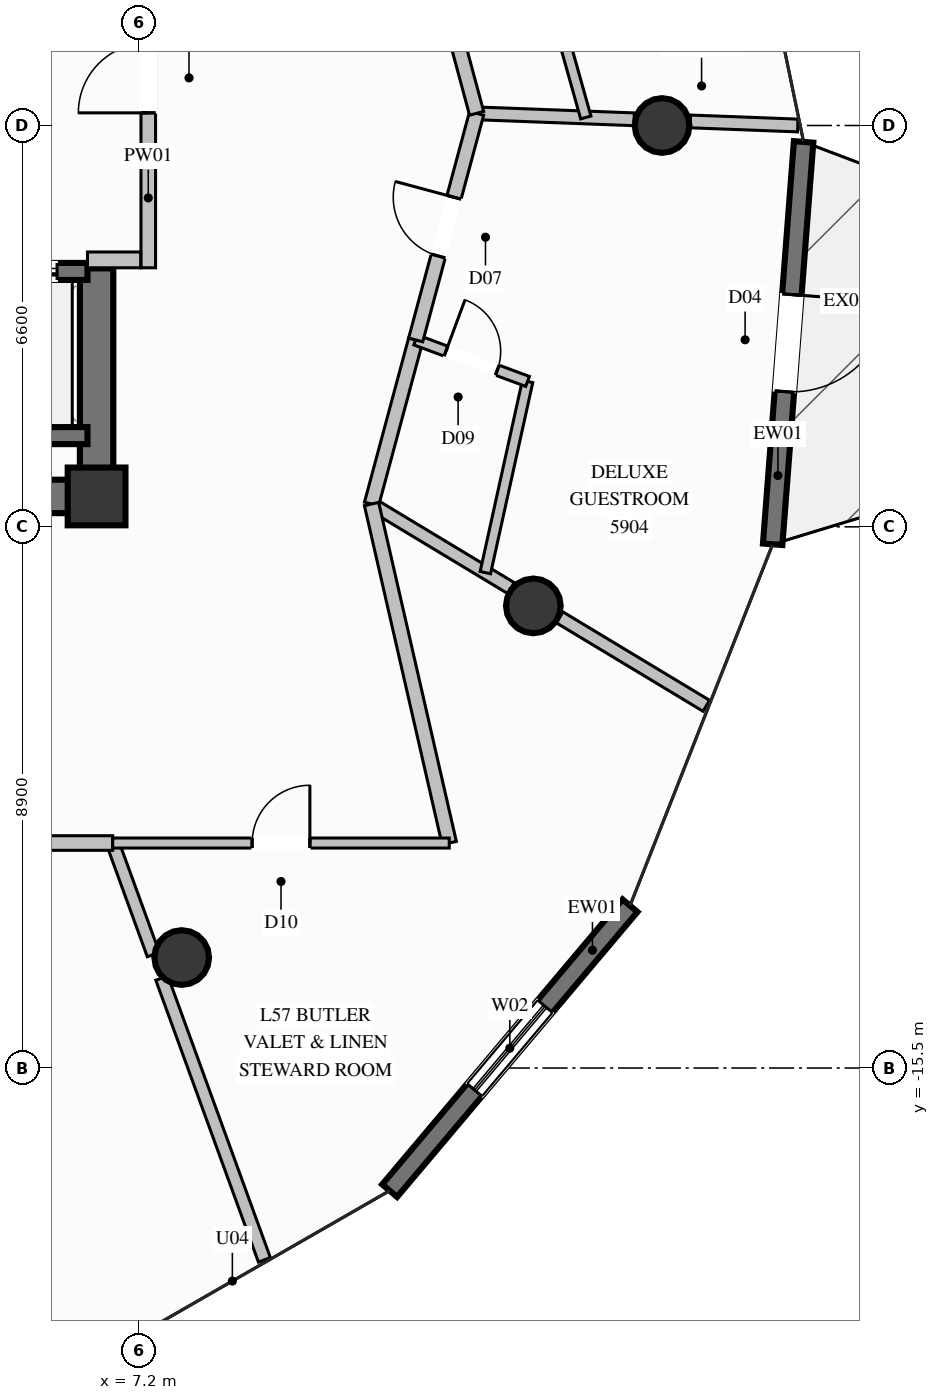
"""IFC4 building model, lengths in metres.
Left out: names, types, materials, properties, quantities, classifications, styles, units other than length and angle.
Written with IfcOpenShell. Run it as: python <this file> out.ifc"""

import sys

from ifc_helpers import new_model, si_unit, direction, frame, frame_2d, origin, origin_2d, place, context, subcontext, project, spatial, rectangle, circle, extrude, element, fill, save


model = new_model("IFC4")
c1 = context("Model", 3, precision=1e-05, world=origin(), true_north=direction((0.0, 1.0)))
c2 = subcontext(c1, "Body", "Model", "MODEL_VIEW")
j1 = project(units=[si_unit("LENGTHUNIT", "METRE"), si_unit("PLANEANGLEUNIT", "RADIAN")], contexts=[c1])
p1 = place(None, origin())
s1 = spatial("IfcSite", under=j1, at=p1, CompositionType="ELEMENT")
p2 = place(p1, origin())
s2 = spatial("IfcBuilding", under=s1, at=p2, CompositionType="ELEMENT")
p3 = place(p2, frame((0.0, 0.0, 220.0)))
s3 = spatial("IfcBuildingStorey", under=s2, at=p3, CompositionType="ELEMENT", Elevation=220.0)
p4 = place(p3, frame((6.5, -6.1, 0.0), z_axis=(0.0, 0.0, 1.0), x_axis=(1.0, 0.0, 0.0)))
e1 = element("IfcColumn", 1, at=p4, inside=s3, PredefinedType="COLUMN", context=c2, shape_type="SweptSolid", body=[
    extrude(rectangle(XDim=0.95, YDim=0.95, at=origin_2d()), origin(), (0.0, 0.0, 1.0), 3.6),
])
p5 = place(p3, frame((4.15, -6.1, 0.0), z_axis=(0.0, 0.0, 1.0), x_axis=(1.0, 0.0, 0.0)))
e2 = element("IfcWall", 2, at=p5, inside=s3, PredefinedType="SHEAR", context=c2, shape_type="SweptSolid", body=[
    extrude(rectangle(XDim=2.075, YDim=0.55, at=frame_2d((1.038, 0.0))), origin(), (0.0, 0.0, 1.0), 3.6),
])
p6 = place(p3, frame((6.5, -6.375, 0.0), z_axis=(0.0, 0.0, 1.0), x_axis=(0.0, 1.0, 0.0)))
e3 = element("IfcWall", 3, at=p6, inside=s3, PredefinedType="SHEAR", context=c2, shape_type="SweptSolid", body=[
    extrude(rectangle(XDim=4.025, YDim=0.55, at=frame_2d((2.012, 0.0))), origin(), (0.0, 0.0, 1.0), 3.6),
])
for number, where, z_axis, x_axis in (
    (4, (15.8, 0.0, 0.0), (0.0, 0.0, 1.0), (1.0, 0.0, 0.0)),
    (5, (7.9, -13.683, 0.0), (0.0, 0.0, 1.0), (1.0, 0.0, 0.0)),
    (6, (13.683, -7.9, 0.0), (0.0, 0.0, 1.0), (1.0, 0.0, 0.0)),
):
    element("IfcColumn", number, at=place(p3, frame(where, z_axis=z_axis, x_axis=x_axis)), inside=s3, PredefinedType="COLUMN", context=c2, shape_type="SweptSolid", body=[
        extrude(circle(Radius=0.45, at=origin_2d()), origin(), (0.0, 0.0, 1.0), 3.6),
    ])
p7 = place(p3, frame((15.273, -12.83, 0.0), z_axis=(0.0, 0.0, 1.0), x_axis=(-0.644700837275, -0.764434974616, 0.0)))
e7 = element("IfcWall", 7, at=p7, inside=s3, PredefinedType="SOLIDWALL", context=c2, shape_type="SweptSolid", body=[
    extrude(rectangle(XDim=6.131, YDim=0.32, at=frame_2d((3.066, 0.0))), origin(), (0.0, 0.0, 1.0), 3.36),
])
p8 = place(p7, frame((2.166, 0.0, 0.35)))
e8 = element("IfcOpeningElement", 8, at=p8, cuts=e7, PredefinedType="OPENING", context=c2, shape_type="SweptSolid", body=[
    extrude(rectangle(XDim=1.8, YDim=2.6, at=frame_2d((0.9, 1.3))), frame((0.0, 0.17, 0.0), z_axis=(0.0, -1.0, 0.0), x_axis=(1.0, 0.0, 0.0)), (0.0, 0.0, 1.0), 0.34),
])
p9 = place(p3, frame((18.128, -0.27, 0.0), z_axis=(0.0, 0.0, 1.0), x_axis=(-0.076702125221, -0.997054052691, 0.0)))
e9 = element("IfcWall", 9, at=p9, inside=s3, PredefinedType="SOLIDWALL", context=c2, shape_type="SweptSolid", body=[
    extrude(rectangle(XDim=6.636, YDim=0.32, at=frame_2d((3.318, 0.0))), origin(), (0.0, 0.0, 1.0), 3.36),
])
p10 = place(p9, frame((2.518, 0.0, 0.0)))
e10 = element("IfcOpeningElement", 10, at=p10, cuts=e9, PredefinedType="OPENING", context=c2, shape_type="SweptSolid", body=[
    extrude(rectangle(XDim=1.6, YDim=2.3, at=frame_2d((0.8, 1.15))), frame((0.0, 0.17, 0.0), z_axis=(0.0, -1.0, 0.0), x_axis=(1.0, 0.0, 0.0)), (0.0, 0.0, 1.0), 0.34),
])
p11 = place(p3, frame((4.15, -5.1, 0.0), z_axis=(0.0, 0.0, 1.0), x_axis=(1.0, 0.0, 0.0)))
e11 = element("IfcWall", 11, at=p11, inside=s3, PredefinedType="SOLIDWALL", context=c2, shape_type="SweptSolid", body=[
    extrude(rectangle(XDim=2.2, YDim=0.28, at=frame_2d((1.1, 0.0))), origin(), (0.0, 0.0, 1.0), 3.36),
])
p12 = place(p3, frame((6.35, -2.4, 0.0), z_axis=(0.0, 0.0, 1.0), x_axis=(-1.0, 0.0, 0.0)))
e12 = element("IfcWall", 12, at=p12, inside=s3, PredefinedType="SOLIDWALL", context=c2, shape_type="SweptSolid", body=[
    extrude(rectangle(XDim=2.2, YDim=0.28, at=frame_2d((1.1, 0.0))), origin(), (0.0, 0.0, 1.0), 3.36),
])
p13 = place(p12, frame((0.5, 0.0, 0.0)))
e13 = element("IfcOpeningElement", 13, at=p13, cuts=e12, PredefinedType="OPENING", context=c2, shape_type="SweptSolid", body=[
    extrude(rectangle(XDim=1.2, YDim=2.2, at=frame_2d((0.6, 1.1))), frame((0.0, 0.15, 0.0), z_axis=(0.0, -1.0, 0.0), x_axis=(1.0, 0.0, 0.0)), (0.0, 0.0, 1.0), 0.3),
])
p14 = place(p3, frame((7.35, -2.34, 0.0), z_axis=(0.0, 0.0, 1.0), x_axis=(0.0, 1.0, 0.0)))
e14 = element("IfcWall", 14, at=p14, inside=s3, PredefinedType="PARTITIONING", context=c2, shape_type="SweptSolid", body=[
    extrude(rectangle(XDim=5.07, YDim=0.24, at=frame_2d((2.535, 0.0))), origin(), (0.0, 0.0, 1.0), 2.445),
])
p15 = place(p14, frame((2.548, 0.0, 0.0)))
e15 = element("IfcOpeningElement", 15, at=p15, cuts=e14, PredefinedType="OPENING", context=c2, shape_type="SweptSolid", body=[
    extrude(rectangle(XDim=1.15, YDim=2.2, at=frame_2d((0.575, 1.1))), frame((0.0, 0.13, 0.0), z_axis=(0.0, -1.0, 0.0), x_axis=(1.0, 0.0, 0.0)), (0.0, 0.0, 1.0), 0.26),
])
p16 = place(p3, frame((6.35, -2.21, 0.0), z_axis=(0.0, 0.0, 1.0), x_axis=(1.0, 0.0, 0.0)))
e16 = element("IfcWall", 16, at=p16, inside=s3, PredefinedType="PARTITIONING", context=c2, shape_type="SweptSolid", body=[
    extrude(rectangle(XDim=0.875, YDim=0.26, at=frame_2d((0.438, 0.0))), origin(), (0.0, 0.0, 1.0), 3.36),
])
p17 = place(p3, frame((12.75, 0.2, 0.0), z_axis=(0.0, 0.0, 1.0), x_axis=(0.999286953718, -0.037756908362, 0.0)))
e17 = element("IfcWall", 17, at=p17, inside=s3, PredefinedType="PARTITIONING", context=c2, shape_type="SweptSolid", body=[
    extrude(rectangle(XDim=2.593, YDim=0.21, at=frame_2d((1.296, 0.0))), origin(), (0.0, 0.0, 1.0), 3.36),
])
p18 = place(p3, frame((16.265, 0.067, 0.0), z_axis=(0.0, 0.0, 1.0), x_axis=(0.999284239873, -0.037828665616, 0.0)))
e18 = element("IfcWall", 18, at=p18, inside=s3, PredefinedType="PARTITIONING", context=c2, shape_type="SweptSolid", body=[
    extrude(rectangle(XDim=1.768, YDim=0.21, at=frame_2d((0.884, 0.0))), origin(), (0.0, 0.0, 1.0), 3.36),
])
p19 = place(p3, frame((11.022, -6.225, 0.0), z_axis=(0.0, 0.0, 1.0), x_axis=(0.856493544161, -0.516157736366, 0.0)))
e19 = element("IfcWall", 19, at=p19, inside=s3, PredefinedType="PARTITIONING", context=c2, shape_type="SweptSolid", body=[
    extrude(rectangle(XDim=2.677, YDim=0.21, at=frame_2d((1.339, 0.0))), origin(), (0.0, 0.0, 1.0), 2.877),
])
p20 = place(p3, frame((14.114, -8.088, 0.0), z_axis=(0.0, 0.0, 1.0), x_axis=(0.856451792667, -0.516227010952, 0.0)))
e20 = element("IfcWall", 20, at=p20, inside=s3, PredefinedType="PARTITIONING", context=c2, shape_type="SweptSolid", body=[
    extrude(rectangle(XDim=2.819, YDim=0.21, at=frame_2d((1.409, 0.0))), origin(), (0.0, 0.0, 1.0), 3.36),
])
p21 = place(p3, frame((11.022, -6.225, 0.0), z_axis=(0.0, 0.0, 1.0), x_axis=(0.259760468719, 0.965673080753, 0.0)))
e21 = element("IfcWall", 21, at=p21, inside=s3, PredefinedType="PARTITIONING", context=c2, shape_type="SweptSolid", body=[
    extrude(rectangle(XDim=2.795, YDim=0.24, at=frame_2d((1.397, 0.0))), origin(), (0.0, 0.0, 1.0), 3.36),
])
p22 = place(p3, frame((12.894, -7.353, 0.0), z_axis=(0.0, 0.0, 1.0), x_axis=(0.215501104313, 0.976503596532, 0.0)))
e22 = element("IfcWall", 22, at=p22, inside=s3, PredefinedType="PLUMBINGWALL", context=c2, shape_type="SweptSolid", body=[
    extrude(rectangle(XDim=3.22, YDim=0.175, at=frame_2d((1.61, 0.0))), origin(), (0.0, 0.0, 1.0), 3.36),
])
p23 = place(p3, frame((11.748, -3.526, 0.0), z_axis=(0.0, 0.0, 1.0), x_axis=(0.937469348432, -0.348067839293, 0.0)))
e23 = element("IfcWall", 23, at=p23, inside=s3, PredefinedType="PLUMBINGWALL", context=c2, shape_type="SweptSolid", body=[
    extrude(rectangle(XDim=1.963, YDim=0.175, at=frame_2d((0.981, 0.0))), origin(), (0.0, 0.0, 1.0), 3.36),
])
p24 = place(p23, frame((0.531, 0.0, 0.0)))
e24 = element("IfcOpeningElement", 24, at=p24, cuts=e23, PredefinedType="OPENING", context=c2, shape_type="SweptSolid", body=[
    extrude(rectangle(XDim=0.9, YDim=2.1, at=frame_2d((0.45, 1.05))), frame((0.0, 0.098, 0.0), z_axis=(0.0, -1.0, 0.0), x_axis=(1.0, 0.0, 0.0)), (0.0, 0.0, 1.0), 0.195),
])
p25 = place(p3, frame((11.748, -3.526, 0.0), z_axis=(0.0, 0.0, 1.0), x_axis=(0.259694339612, 0.965690866672, 0.0)))
e25 = element("IfcWall", 25, at=p25, inside=s3, PredefinedType="PARTITIONING", context=c2, shape_type="SweptSolid", body=[
    extrude(rectangle(XDim=3.858, YDim=0.24, at=frame_2d((1.929, 0.0))), origin(), (0.0, 0.0, 1.0), 3.36),
])
p26 = place(p25, frame((1.429, 0.0, 0.0)))
e26 = element("IfcOpeningElement", 26, at=p26, cuts=e25, PredefinedType="OPENING", context=c2, shape_type="SweptSolid", body=[
    extrude(rectangle(XDim=1.0, YDim=2.2, at=frame_2d((0.5, 1.1))), frame((0.0, 0.13, 0.0), z_axis=(0.0, -1.0, 0.0), x_axis=(1.0, 0.0, 0.0)), (0.0, 0.0, 1.0), 0.26),
])
p27 = place(p3, frame((12.75, 0.2, 0.0), z_axis=(0.0, 0.0, 1.0), x_axis=(-0.259870061474, 0.965643594267, 0.0)))
e27 = element("IfcWall", 27, at=p27, inside=s3, PredefinedType="PARTITIONING", context=c2, shape_type="SweptSolid", body=[
    extrude(rectangle(XDim=2.794, YDim=0.24, at=frame_2d((1.397, 0.0))), origin(), (0.0, 0.0, 1.0), 3.36),
])
p28 = place(p3, frame((14.546, 0.132, 0.0), z_axis=(0.0, 0.0, 1.0), x_axis=(-0.270218787855, 0.962798944064, 0.0)))
e28 = element("IfcWall", 28, at=p28, inside=s3, PredefinedType="PLUMBINGWALL", context=c2, shape_type="SweptSolid", body=[
    extrude(rectangle(XDim=3.168, YDim=0.175, at=frame_2d((1.584, 0.0))), origin(), (0.0, 0.0, 1.0), 3.36),
])
p29 = place(p3, frame((6.765, -11.8, 0.0), z_axis=(0.0, 0.0, 1.0), x_axis=(0.342335512807, -0.939577775743, 0.0)))
e29 = element("IfcWall", 29, at=p29, inside=s3, PredefinedType="PARTITIONING", context=c2, shape_type="SweptSolid", body=[
    extrude(rectangle(XDim=1.952, YDim=0.21, at=frame_2d((0.976, 0.0))), origin(), (0.0, 0.0, 1.0), 2.877),
])
p30 = place(p3, frame((7.573, -14.021, 0.0), z_axis=(0.0, 0.0, 1.0), x_axis=(0.342084883254, -0.939669054854, 0.0)))
e30 = element("IfcWall", 30, at=p30, inside=s3, PredefinedType="PARTITIONING", context=c2, shape_type="SweptSolid", body=[
    extrude(rectangle(XDim=4.932, YDim=0.21, at=frame_2d((2.466, 0.0))), origin(), (0.0, 0.0, 1.0), 3.36),
])
p31 = place(p3, frame((0.0, -11.8, 0.0), z_axis=(0.0, 0.0, 1.0), x_axis=(1.0, 0.0, 0.0)))
e31 = element("IfcWall", 31, at=p31, inside=s3, PredefinedType="PARTITIONING", context=c2, shape_type="SweptSolid", body=[
    extrude(rectangle(XDim=6.765, YDim=0.24, at=frame_2d((3.382, 0.0))), origin(), (0.0, 0.0, 1.0), 3.36),
])
p32 = place(p31, frame((2.882, 0.0, 0.0)))
e32 = element("IfcOpeningElement", 32, at=p32, cuts=e31, PredefinedType="OPENING", context=c2, shape_type="SweptSolid", body=[
    extrude(rectangle(XDim=1.0, YDim=2.2, at=frame_2d((0.5, 1.1))), frame((0.0, 0.13, 0.0), z_axis=(0.0, -1.0, 0.0), x_axis=(1.0, 0.0, 0.0)), (0.0, 0.0, 1.0), 0.26),
])
p33 = place(p3, frame((12.3, -11.8, 0.0), z_axis=(0.0, 0.0, 1.0), x_axis=(-0.223456421134, 0.974713921032, 0.0)))
e33 = element("IfcWall", 33, at=p33, inside=s3, PredefinedType="PARTITIONING", context=c2, shape_type="SweptSolid", body=[
    extrude(rectangle(XDim=5.719, YDim=0.24, at=frame_2d((2.86, 0.0))), origin(), (0.0, 0.0, 1.0), 3.36),
])
p34 = place(p3, frame((6.765, -11.8, 0.0), z_axis=(0.0, 0.0, 1.0), x_axis=(1.0, 0.0, 0.0)))
e34 = element("IfcWall", 34, at=p34, inside=s3, PredefinedType="PARTITIONING", context=c2, shape_type="SweptSolid", body=[
    extrude(rectangle(XDim=5.535, YDim=0.165, at=frame_2d((2.768, 0.0))), origin(), (0.0, 0.0, 1.0), 3.36),
])
p35 = place(p34, frame((2.293, 0.0, 0.0)))
e35 = element("IfcOpeningElement", 35, at=p35, cuts=e34, PredefinedType="OPENING", context=c2, shape_type="SweptSolid", body=[
    extrude(rectangle(XDim=0.95, YDim=2.1, at=frame_2d((0.475, 1.05))), frame((0.0, 0.093, 0.0), z_axis=(0.0, -1.0, 0.0), x_axis=(1.0, 0.0, 0.0)), (0.0, 0.0, 1.0), 0.185),
])
p36 = place(p8, origin())
e36 = element("IfcWindow", 36, at=p36, inside=s3, PartitioningType="SINGLE_PANEL", PredefinedType="WINDOW", context=c2, shape_type="SweptSolid", body=[
    extrude(rectangle(XDim=1.8, YDim=2.6, at=frame_2d((0.9, 1.3))), frame((0.0, 0.03, 0.0), z_axis=(0.0, -1.0, 0.0), x_axis=(1.0, 0.0, 0.0)), (0.0, 0.0, 1.0), 0.06),
])
fill(e8, e36)
p37 = place(p10, origin())
e37 = element("IfcDoor", 37, at=p37, inside=s3, OperationType="SINGLE_SWING_LEFT", PredefinedType="DOOR", context=c2, shape_type="SweptSolid", body=[
    extrude(rectangle(XDim=1.6, YDim=2.3, at=frame_2d((0.8, 1.15))), frame((0.0, 0.025, 0.0), z_axis=(0.0, -1.0, 0.0), x_axis=(1.0, 0.0, 0.0)), (0.0, 0.0, 1.0), 0.05),
])
fill(e10, e37)
p38 = place(p13, origin())
e38 = element("IfcDoor", 38, at=p38, inside=s3, OperationType="SLIDING_TO_LEFT", PredefinedType="DOOR", context=c2, shape_type="SweptSolid", body=[
    extrude(rectangle(XDim=1.2, YDim=2.2, at=frame_2d((0.6, 1.1))), frame((0.0, 0.025, 0.0), z_axis=(0.0, -1.0, 0.0), x_axis=(1.0, 0.0, 0.0)), (0.0, 0.0, 1.0), 0.05),
])
fill(e13, e38)
p39 = place(p15, origin())
e39 = element("IfcDoor", 39, at=p39, inside=s3, OperationType="SINGLE_SWING_LEFT", PredefinedType="DOOR", context=c2, shape_type="SweptSolid", body=[
    extrude(rectangle(XDim=1.15, YDim=2.2, at=frame_2d((0.575, 1.1))), frame((0.0, 0.025, 0.0), z_axis=(0.0, -1.0, 0.0), x_axis=(1.0, 0.0, 0.0)), (0.0, 0.0, 1.0), 0.05),
])
fill(e15, e39)
p40 = place(p24, origin())
e40 = element("IfcDoor", 40, at=p40, inside=s3, OperationType="SINGLE_SWING_LEFT", PredefinedType="DOOR", context=c2, shape_type="SweptSolid", body=[
    extrude(rectangle(XDim=0.9, YDim=2.1, at=frame_2d((0.45, 1.05))), frame((0.0, 0.025, 0.0), z_axis=(0.0, -1.0, 0.0), x_axis=(1.0, 0.0, 0.0)), (0.0, 0.0, 1.0), 0.05),
])
fill(e24, e40)
p41 = place(p26, origin())
e41 = element("IfcDoor", 41, at=p41, inside=s3, OperationType="SINGLE_SWING_RIGHT", PredefinedType="DOOR", context=c2, shape_type="SweptSolid", body=[
    extrude(rectangle(XDim=1.0, YDim=2.2, at=frame_2d((0.5, 1.1))), frame((0.0, 0.025, 0.0), z_axis=(0.0, -1.0, 0.0), x_axis=(1.0, 0.0, 0.0)), (0.0, 0.0, 1.0), 0.05),
])
fill(e26, e41)
p42 = place(p35, origin())
e42 = element("IfcDoor", 42, at=p42, inside=s3, OperationType="SINGLE_SWING_RIGHT", PredefinedType="DOOR", context=c2, shape_type="SweptSolid", body=[
    extrude(rectangle(XDim=0.95, YDim=2.1, at=frame_2d((0.475, 1.05))), frame((0.0, 0.025, 0.0), z_axis=(0.0, -1.0, 0.0), x_axis=(1.0, 0.0, 0.0)), (0.0, 0.0, 1.0), 0.05),
])
fill(e35, e42)
save(model, sys.argv[1])
